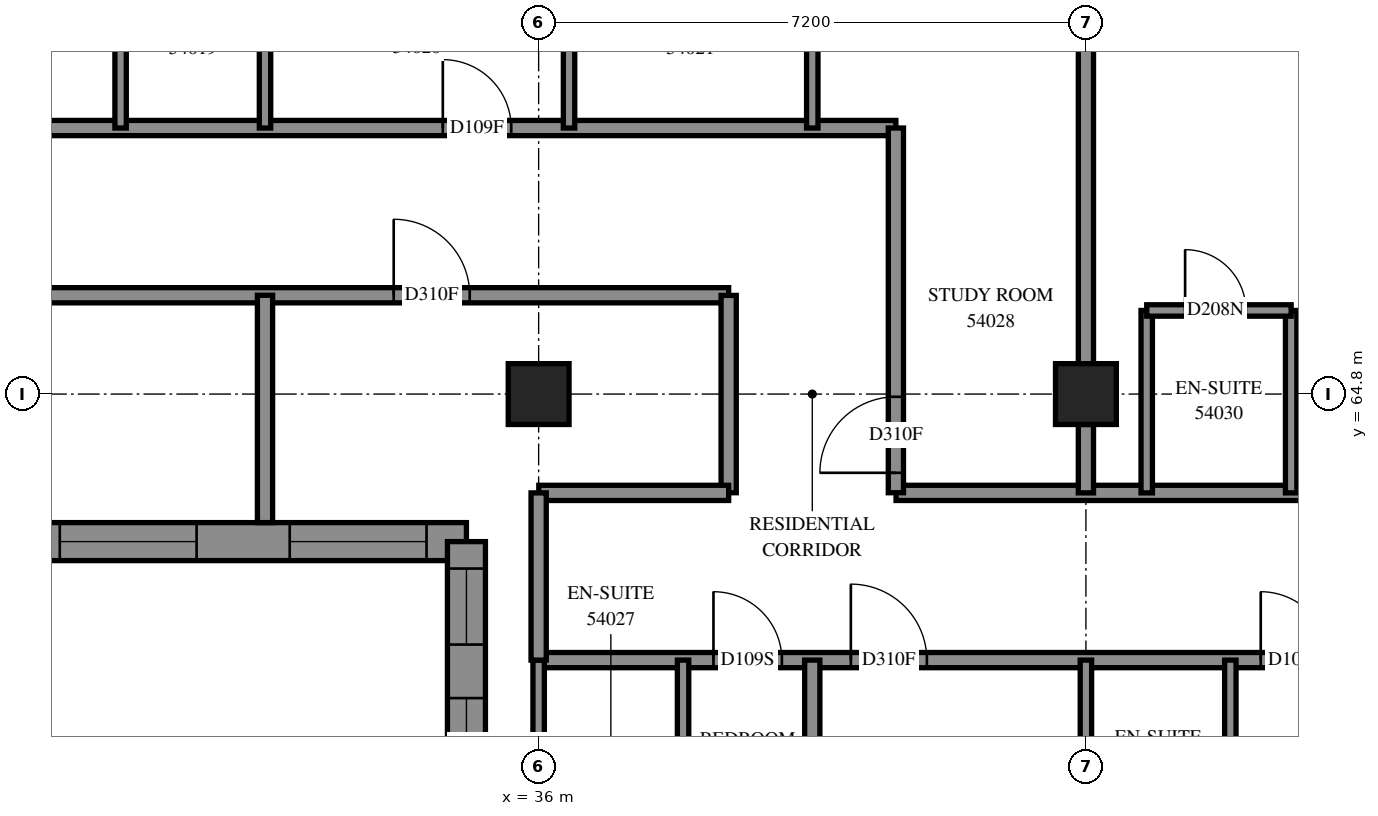
"""IFC4 building model, lengths in metres.
Left out: names, types, materials, properties, quantities, classifications, styles, units other than length and angle.
Written with IfcOpenShell. Run it as: python <this file> out.ifc"""

import sys

from ifc_helpers import new_model, si_unit, direction, frame, frame_2d, origin, origin_2d, place, context, subcontext, project, spatial, polyline, rectangle, outline, extrude, element, fill, save


model = new_model("IFC4")
c1 = context("Model", 3, precision=1e-05, world=origin(), true_north=direction((0.0, 1.0)))
c2 = subcontext(c1, "Body", "Model", "MODEL_VIEW")
j1 = project(units=[si_unit("LENGTHUNIT", "METRE"), si_unit("PLANEANGLEUNIT", "RADIAN")], contexts=[c1])
p1 = place(None, origin())
s1 = spatial("IfcSite", under=j1, at=p1, CompositionType="ELEMENT")
p2 = place(p1, origin())
s2 = spatial("IfcBuilding", under=s1, at=p2, CompositionType="ELEMENT")
p3 = place(p2, frame((0.0, 0.0, 199.8)))
s3 = spatial("IfcBuildingStorey", under=s2, at=p3, CompositionType="ELEMENT", Elevation=199.8)
for number, where, z_axis, x_axis in (
    (1, (36.0, 64.8, 0.0), (0.0, 0.0, 1.0), (1.0, 0.0, 0.0)),
    (2, (43.2, 64.8, 0.0), (0.0, 0.0, 1.0), (1.0, 0.0, 0.0)),
):
    element("IfcColumn", number, at=place(p3, frame(where, z_axis=z_axis, x_axis=x_axis)), inside=s3, PredefinedType="COLUMN", context=c2, shape_type="SweptSolid", body=[
        extrude(rectangle(XDim=0.8, YDim=0.8, at=origin_2d()), origin(), (0.0, 0.0, 1.0), 3.1),
    ])
p4 = place(p3, frame((19.659, 62.859, 0.0), z_axis=(0.0, 0.0, 1.0), x_axis=(1.0, 0.0, 0.0)))
e3 = element("IfcWall", 3, at=p4, inside=s3, PredefinedType="SOLIDWALL", context=c2, shape_type="SweptSolid", body=[
    extrude(outline(polyline([(-0.25, -0.25), (15.141, -0.25), (15.641, 0.25), (0.25, 0.25), (-0.25, -0.25)])), origin(), (0.0, 0.0, 1.0), 2.6),
])
p5 = place(p4, frame((2.691, 0.0, 0.6)))
e4 = element("IfcOpeningElement", 4, at=p5, cuts=e3, PredefinedType="OPENING", context=c2, shape_type="SweptSolid", body=[
    extrude(rectangle(XDim=1.8, YDim=1.9, at=frame_2d((0.9, 0.95))), frame((0.0, 0.26, 0.0), z_axis=(0.0, -1.0, 0.0), x_axis=(1.0, 0.0, 0.0)), (0.0, 0.0, 1.0), 0.52),
])
p6 = place(p4, frame((6.441, 0.0, 0.6)))
e5 = element("IfcOpeningElement", 5, at=p6, cuts=e3, PredefinedType="OPENING", context=c2, shape_type="SweptSolid", body=[
    extrude(rectangle(XDim=1.8, YDim=1.9, at=frame_2d((0.9, 0.95))), frame((0.0, 0.26, 0.0), z_axis=(0.0, -1.0, 0.0), x_axis=(1.0, 0.0, 0.0)), (0.0, 0.0, 1.0), 0.52),
])
p7 = place(p4, frame((10.041, 0.0, 0.6)))
e6 = element("IfcOpeningElement", 6, at=p7, cuts=e3, PredefinedType="OPENING", context=c2, shape_type="SweptSolid", body=[
    extrude(rectangle(XDim=1.8, YDim=1.9, at=frame_2d((0.9, 0.95))), frame((0.0, 0.26, 0.0), z_axis=(0.0, -1.0, 0.0), x_axis=(1.0, 0.0, 0.0)), (0.0, 0.0, 1.0), 0.52),
])
p8 = place(p4, frame((13.066, 0.0, 0.6)))
e7 = element("IfcOpeningElement", 7, at=p8, cuts=e3, PredefinedType="OPENING", context=c2, shape_type="SweptSolid", body=[
    extrude(rectangle(XDim=1.8, YDim=1.9, at=frame_2d((0.9, 0.95))), frame((0.0, 0.26, 0.0), z_axis=(0.0, -1.0, 0.0), x_axis=(1.0, 0.0, 0.0)), (0.0, 0.0, 1.0), 0.52),
])
p9 = place(p4, frame((0.596, 0.0, 0.6)))
e8 = element("IfcOpeningElement", 8, at=p9, cuts=e3, PredefinedType="OPENING", context=c2, shape_type="SweptSolid", body=[
    extrude(rectangle(XDim=1.2, YDim=1.9, at=frame_2d((0.6, 0.95))), frame((0.0, 0.26, 0.0), z_axis=(0.0, -1.0, 0.0), x_axis=(1.0, 0.0, 0.0)), (0.0, 0.0, 1.0), 0.52),
])
p10 = place(p3, frame((35.05, 62.859, 0.0), z_axis=(0.0, 0.0, 1.0), x_axis=(0.0, -1.0, 0.0)))
e9 = element("IfcWall", 9, at=p10, inside=s3, PredefinedType="SOLIDWALL", context=c2, shape_type="SweptSolid", body=[
    extrude(outline(polyline([(0.25, -0.25), (6.459, -0.25), (5.959, 0.25), (-0.25, 0.25), (0.25, -0.25)])), origin(), (0.0, 0.0, 1.0), 3.1),
])
p11 = place(p10, frame((2.059, 0.0, 0.45)))
e10 = element("IfcOpeningElement", 10, at=p11, cuts=e9, PredefinedType="OPENING", context=c2, shape_type="SweptSolid", body=[
    extrude(rectangle(XDim=1.3, YDim=2.5, at=frame_2d((0.65, 1.25))), frame((0.0, 0.26, 0.0), z_axis=(0.0, -1.0, 0.0), x_axis=(1.0, 0.0, 0.0)), (0.0, 0.0, 1.0), 0.52),
])
p12 = place(p10, frame((4.109, 0.0, 0.45)))
e11 = element("IfcOpeningElement", 11, at=p12, cuts=e9, PredefinedType="OPENING", context=c2, shape_type="SweptSolid", body=[
    extrude(rectangle(XDim=1.3, YDim=2.5, at=frame_2d((0.65, 1.25))), frame((0.0, 0.26, 0.0), z_axis=(0.0, -1.0, 0.0), x_axis=(1.0, 0.0, 0.0)), (0.0, 0.0, 1.0), 0.52),
])
p13 = place(p10, frame((0.354, 0.0, 0.45)))
e12 = element("IfcOpeningElement", 12, at=p13, cuts=e9, PredefinedType="OPENING", context=c2, shape_type="SweptSolid", body=[
    extrude(rectangle(XDim=1.0, YDim=2.5, at=frame_2d((0.5, 1.25))), frame((0.0, 0.26, 0.0), z_axis=(0.0, -1.0, 0.0), x_axis=(1.0, 0.0, 0.0)), (0.0, 0.0, 1.0), 0.52),
])
p14 = place(p3, frame((21.6, 68.3, 0.0), z_axis=(0.0, 0.0, 1.0), x_axis=(1.0, 0.0, 0.0)))
e13 = element("IfcWall", 13, at=p14, inside=s3, PredefinedType="PARTITIONING", context=c2, shape_type="SweptSolid", body=[
    extrude(rectangle(XDim=19.1, YDim=0.2, at=frame_2d((9.55, 0.0))), origin(), (0.0, 0.0, 1.0), 3.1),
])
p15 = place(p14, frame((2.3, 0.0, 0.0)))
e14 = element("IfcOpeningElement", 14, at=p15, cuts=e13, PredefinedType="OPENING", context=c2, shape_type="SweptSolid", body=[
    extrude(rectangle(XDim=0.9, YDim=2.1, at=frame_2d((0.45, 1.05))), frame((0.0, 0.11, 0.0), z_axis=(0.0, -1.0, 0.0), x_axis=(1.0, 0.0, 0.0)), (0.0, 0.0, 1.0), 0.22),
])
p16 = place(p14, frame((5.901, 0.0, 0.0)))
e15 = element("IfcOpeningElement", 15, at=p16, cuts=e13, PredefinedType="OPENING", context=c2, shape_type="SweptSolid", body=[
    extrude(rectangle(XDim=0.9, YDim=2.1, at=frame_2d((0.45, 1.05))), frame((0.0, 0.11, 0.0), z_axis=(0.0, -1.0, 0.0), x_axis=(1.0, 0.0, 0.0)), (0.0, 0.0, 1.0), 0.22),
])
p17 = place(p14, frame((13.139, 0.0, 0.0)))
e16 = element("IfcOpeningElement", 16, at=p17, cuts=e13, PredefinedType="OPENING", context=c2, shape_type="SweptSolid", body=[
    extrude(rectangle(XDim=0.9, YDim=2.1, at=frame_2d((0.45, 1.05))), frame((0.0, 0.11, 0.0), z_axis=(0.0, -1.0, 0.0), x_axis=(1.0, 0.0, 0.0)), (0.0, 0.0, 1.0), 0.22),
])
p18 = place(p3, frame((21.6, 66.1, 0.0), z_axis=(0.0, 0.0, 1.0), x_axis=(1.0, 0.0, 0.0)))
e17 = element("IfcWall", 17, at=p18, inside=s3, PredefinedType="PARTITIONING", context=c2, shape_type="SweptSolid", body=[
    extrude(rectangle(XDim=16.9, YDim=0.2, at=frame_2d((8.45, 0.0))), origin(), (0.0, 0.0, 1.0), 3.1),
])
p19 = place(p18, frame((12.493, 0.0, 0.0)))
e18 = element("IfcOpeningElement", 18, at=p19, cuts=e17, PredefinedType="OPENING", context=c2, shape_type="SweptSolid", body=[
    extrude(rectangle(XDim=1.0, YDim=2.1, at=frame_2d((0.5, 1.05))), frame((0.0, 0.11, 0.0), z_axis=(0.0, -1.0, 0.0), x_axis=(1.0, 0.0, 0.0)), (0.0, 0.0, 1.0), 0.22),
])
p20 = place(p3, frame((36.0, 61.3, 0.0), z_axis=(0.0, 0.0, 1.0), x_axis=(1.0, 0.0, 0.0)))
e19 = element("IfcWall", 19, at=p20, inside=s3, PredefinedType="PARTITIONING", context=c2, shape_type="SweptSolid", body=[
    extrude(rectangle(XDim=16.9, YDim=0.2, at=frame_2d((8.45, 0.0))), origin(), (0.0, 0.0, 1.0), 3.1),
])
p21 = place(p20, frame((2.3, 0.0, 0.0)))
e20 = element("IfcOpeningElement", 20, at=p21, cuts=e19, PredefinedType="OPENING", context=c2, shape_type="SweptSolid", body=[
    extrude(rectangle(XDim=0.9, YDim=2.1, at=frame_2d((0.45, 1.05))), frame((0.0, 0.11, 0.0), z_axis=(0.0, -1.0, 0.0), x_axis=(1.0, 0.0, 0.0)), (0.0, 0.0, 1.0), 0.22),
])
p22 = place(p20, frame((4.107, 0.0, 0.0)))
e21 = element("IfcOpeningElement", 21, at=p22, cuts=e19, PredefinedType="OPENING", context=c2, shape_type="SweptSolid", body=[
    extrude(rectangle(XDim=1.0, YDim=2.1, at=frame_2d((0.5, 1.05))), frame((0.0, 0.11, 0.0), z_axis=(0.0, -1.0, 0.0), x_axis=(1.0, 0.0, 0.0)), (0.0, 0.0, 1.0), 0.22),
])
p23 = place(p20, frame((9.5, 0.0, 0.0)))
e22 = element("IfcOpeningElement", 22, at=p23, cuts=e19, PredefinedType="OPENING", context=c2, shape_type="SweptSolid", body=[
    extrude(rectangle(XDim=0.9, YDim=2.1, at=frame_2d((0.45, 1.05))), frame((0.0, 0.11, 0.0), z_axis=(0.0, -1.0, 0.0), x_axis=(1.0, 0.0, 0.0)), (0.0, 0.0, 1.0), 0.22),
])
p24 = place(p20, frame((11.307, 0.0, 0.0)))
e23 = element("IfcOpeningElement", 23, at=p24, cuts=e19, PredefinedType="OPENING", context=c2, shape_type="SweptSolid", body=[
    extrude(rectangle(XDim=1.0, YDim=2.1, at=frame_2d((0.5, 1.05))), frame((0.0, 0.11, 0.0), z_axis=(0.0, -1.0, 0.0), x_axis=(1.0, 0.0, 0.0)), (0.0, 0.0, 1.0), 0.22),
])
p25 = place(p20, frame((15.647, 0.0, 0.0)))
e24 = element("IfcOpeningElement", 24, at=p25, cuts=e19, PredefinedType="OPENING", context=c2, shape_type="SweptSolid", body=[
    extrude(rectangle(XDim=1.0, YDim=2.1, at=frame_2d((0.5, 1.05))), frame((0.0, 0.11, 0.0), z_axis=(0.0, -1.0, 0.0), x_axis=(1.0, 0.0, 0.0)), (0.0, 0.0, 1.0), 0.22),
])
p26 = place(p3, frame((40.702, 63.5, 0.0), z_axis=(0.0, 0.0, 1.0), x_axis=(1.0, 0.0, 0.0)))
e25 = element("IfcWall", 25, at=p26, inside=s3, PredefinedType="PARTITIONING", context=c2, shape_type="SweptSolid", body=[
    extrude(rectangle(XDim=14.298, YDim=0.2, at=frame_2d((7.149, 0.0))), origin(), (0.0, 0.0, 1.0), 3.1),
])
p27 = place(p26, frame((6.332, 0.0, 0.0)))
e26 = element("IfcOpeningElement", 26, at=p27, cuts=e25, PredefinedType="OPENING", context=c2, shape_type="SweptSolid", body=[
    extrude(rectangle(XDim=0.9, YDim=2.1, at=frame_2d((0.45, 1.05))), frame((0.0, 0.11, 0.0), z_axis=(0.0, -1.0, 0.0), x_axis=(1.0, 0.0, 0.0)), (0.0, 0.0, 1.0), 0.22),
])
p28 = place(p26, frame((10.098, 0.0, 0.0)))
e27 = element("IfcOpeningElement", 27, at=p28, cuts=e25, PredefinedType="OPENING", context=c2, shape_type="SweptSolid", body=[
    extrude(rectangle(XDim=0.9, YDim=2.1, at=frame_2d((0.45, 1.05))), frame((0.0, 0.11, 0.0), z_axis=(0.0, -1.0, 0.0), x_axis=(1.0, 0.0, 0.0)), (0.0, 0.0, 1.0), 0.22),
])
p29 = place(p3, frame((43.2, 65.2, 0.0), z_axis=(0.0, 0.0, 1.0), x_axis=(0.0, 1.0, 0.0)))
e28 = element("IfcWall", 28, at=p29, inside=s3, PredefinedType="PARTITIONING", context=c2, shape_type="SweptSolid", body=[
    extrude(rectangle(XDim=6.4, YDim=0.2, at=frame_2d((3.2, 0.0))), origin(), (0.0, 0.0, 1.0), 3.1),
])
p30 = place(p3, frame((40.7, 63.502, 0.0), z_axis=(0.0, 0.0, 1.0), x_axis=(0.0, 1.0, 0.0)))
e29 = element("IfcWall", 29, at=p30, inside=s3, PredefinedType="PARTITIONING", context=c2, shape_type="SweptSolid", body=[
    extrude(rectangle(XDim=4.798, YDim=0.2, at=frame_2d((2.399, 0.0))), origin(), (0.0, 0.0, 1.0), 3.1),
])
p31 = place(p30, frame((0.262, 0.0, 0.0)))
e30 = element("IfcOpeningElement", 30, at=p31, cuts=e29, PredefinedType="OPENING", context=c2, shape_type="SweptSolid", body=[
    extrude(rectangle(XDim=1.0, YDim=2.1, at=frame_2d((0.5, 1.05))), frame((0.0, 0.11, 0.0), z_axis=(0.0, -1.0, 0.0), x_axis=(1.0, 0.0, 0.0)), (0.0, 0.0, 1.0), 0.22),
])
p32 = place(p3, frame((39.6, 56.9, 0.0), z_axis=(0.0, 0.0, 1.0), x_axis=(0.0, 1.0, 0.0)))
e31 = element("IfcWall", 31, at=p32, inside=s3, PredefinedType="PARTITIONING", context=c2, shape_type="SweptSolid", body=[
    extrude(rectangle(XDim=4.4, YDim=0.2, at=frame_2d((2.2, 0.0))), origin(), (0.0, 0.0, 1.0), 3.1),
])
p33 = place(p3, frame((32.4, 63.109, 0.0), z_axis=(0.0, 0.0, 1.0), x_axis=(0.0, 1.0, 0.0)))
e32 = element("IfcWall", 32, at=p33, inside=s3, PredefinedType="PARTITIONING", context=c2, shape_type="SweptSolid", body=[
    extrude(rectangle(XDim=2.991, YDim=0.2, at=frame_2d((1.496, 0.0))), origin(), (0.0, 0.0, 1.0), 3.1),
])
p34 = place(p3, frame((38.5, 63.502, 0.0), z_axis=(0.0, 0.0, 1.0), x_axis=(0.0, 1.0, 0.0)))
e33 = element("IfcWall", 33, at=p34, inside=s3, PredefinedType="PARTITIONING", context=c2, shape_type="SweptSolid", body=[
    extrude(rectangle(XDim=2.596, YDim=0.2, at=frame_2d((1.298, 0.0))), origin(), (0.0, 0.0, 1.0), 3.1),
])
p35 = place(p3, frame((36.002, 63.5, 0.0), z_axis=(0.0, 0.0, 1.0), x_axis=(1.0, 0.0, 0.0)))
e34 = element("IfcWall", 34, at=p35, inside=s3, PredefinedType="PARTITIONING", context=c2, shape_type="SweptSolid", body=[
    extrude(rectangle(XDim=2.498, YDim=0.2, at=frame_2d((1.249, 0.0))), origin(), (0.0, 0.0, 1.0), 3.1),
])
for number, where, z_axis, x_axis in (
    (35, (30.5, 68.3, 0.0), (0.0, 0.0, 1.0), (0.0, 1.0, 0.0)),
    (36, (32.4, 68.3, 0.0), (0.0, 0.0, 1.0), (0.0, 1.0, 0.0)),
    (37, (36.4, 68.3, 0.0), (0.0, 0.0, 1.0), (0.0, 1.0, 0.0)),
    (38, (39.6, 68.3, 0.0), (0.0, 0.0, 1.0), (0.0, 1.0, 0.0)),
    (39, (44.0, 63.5, 0.0), (0.0, 0.0, 1.0), (0.0, 1.0, 0.0)),
    (40, (45.9, 63.5, 0.0), (0.0, 0.0, 1.0), (0.0, 1.0, 0.0)),
    (41, (37.9, 58.9, 0.0), (0.0, 0.0, 1.0), (0.0, 1.0, 0.0)),
):
    element("IfcWall", number, at=place(p3, frame(where, z_axis=z_axis, x_axis=x_axis)), inside=s3, PredefinedType="PARTITIONING", context=c2, shape_type="SweptSolid", body=[
        extrude(rectangle(XDim=2.4, YDim=0.15, at=frame_2d((1.2, 0.0))), origin(), (0.0, 0.0, 1.0), 3.1),
    ])
p36 = place(p3, frame((36.0, 58.9, 0.0), z_axis=(0.0, 0.0, 1.0), x_axis=(0.0, 1.0, 0.0)))
e42 = element("IfcWall", 42, at=p36, inside=s3, PredefinedType="PARTITIONING", context=c2, shape_type="SweptSolid", body=[
    extrude(rectangle(XDim=2.4, YDim=0.15, at=frame_2d((1.2, 0.0))), origin(), (0.0, 0.0, 1.0), 2.6),
])
for number, where, z_axis, x_axis in (
    (43, (45.1, 58.9, 0.0), (0.0, 0.0, 1.0), (0.0, 1.0, 0.0)),
    (44, (43.2, 58.9, 0.0), (0.0, 0.0, 1.0), (0.0, 1.0, 0.0)),
):
    element("IfcWall", number, at=place(p3, frame(where, z_axis=z_axis, x_axis=x_axis)), inside=s3, PredefinedType="PARTITIONING", context=c2, shape_type="SweptSolid", body=[
        extrude(rectangle(XDim=2.4, YDim=0.15, at=frame_2d((1.2, 0.0))), origin(), (0.0, 0.0, 1.0), 3.1),
    ])
p37 = place(p3, frame((36.0, 61.3, 0.0), z_axis=(0.0, 0.0, 1.0), x_axis=(0.0, 1.0, 0.0)))
e45 = element("IfcWall", 45, at=p37, inside=s3, PredefinedType="PARTITIONING", context=c2, shape_type="SweptSolid", body=[
    extrude(rectangle(XDim=2.2, YDim=0.2, at=frame_2d((1.1, 0.0))), origin(), (0.0, 0.0, 1.0), 2.6),
])
p38 = place(p3, frame((44.0, 65.9, 0.0), z_axis=(0.0, 0.0, 1.0), x_axis=(1.0, 0.0, 0.0)))
e46 = element("IfcWall", 46, at=p38, inside=s3, PredefinedType="PARTITIONING", context=c2, shape_type="SweptSolid", body=[
    extrude(rectangle(XDim=1.9, YDim=0.15, at=frame_2d((0.95, 0.0))), origin(), (0.0, 0.0, 1.0), 3.1),
])
p39 = place(p38, frame((0.505, 0.0, 0.0)))
e47 = element("IfcOpeningElement", 47, at=p39, cuts=e46, PredefinedType="OPENING", context=c2, shape_type="SweptSolid", body=[
    extrude(rectangle(XDim=0.8, YDim=2.1, at=frame_2d((0.4, 1.05))), frame((0.0, 0.085, 0.0), z_axis=(0.0, -1.0, 0.0), x_axis=(1.0, 0.0, 0.0)), (0.0, 0.0, 1.0), 0.17),
])
p40 = place(p3, frame((43.2, 63.5, 0.0), z_axis=(0.0, 0.0, 1.0), x_axis=(0.0, 1.0, 0.0)))
e48 = element("IfcWall", 48, at=p40, inside=s3, PredefinedType="PARTITIONING", context=c2, shape_type="SweptSolid", body=[
    extrude(rectangle(XDim=0.9, YDim=0.2, at=frame_2d((0.45, 0.0))), origin(), (0.0, 0.0, 1.0), 3.1),
])
p41 = place(p7, origin())
e49 = element("IfcWindow", 49, at=p41, inside=s3, PartitioningType="SINGLE_PANEL", PredefinedType="WINDOW", context=c2, shape_type="SweptSolid", body=[
    extrude(rectangle(XDim=1.8, YDim=1.9, at=frame_2d((0.9, 0.95))), frame((0.0, 0.18, 0.0), z_axis=(0.0, -1.0, 0.0), x_axis=(1.0, 0.0, 0.0)), (0.0, 0.0, 1.0), 0.06),
])
fill(e6, e49)
p42 = place(p8, origin())
e50 = element("IfcWindow", 50, at=p42, inside=s3, PartitioningType="SINGLE_PANEL", PredefinedType="WINDOW", context=c2, shape_type="SweptSolid", body=[
    extrude(rectangle(XDim=1.8, YDim=1.9, at=frame_2d((0.9, 0.95))), frame((0.0, 0.18, 0.0), z_axis=(0.0, -1.0, 0.0), x_axis=(1.0, 0.0, 0.0)), (0.0, 0.0, 1.0), 0.06),
])
fill(e7, e50)
p43 = place(p11, origin())
e51 = element("IfcWindow", 51, at=p43, inside=s3, PartitioningType="SINGLE_PANEL", PredefinedType="WINDOW", context=c2, shape_type="SweptSolid", body=[
    extrude(rectangle(XDim=1.3, YDim=2.5, at=frame_2d((0.65, 1.25))), frame((0.0, 0.18, 0.0), z_axis=(0.0, -1.0, 0.0), x_axis=(1.0, 0.0, 0.0)), (0.0, 0.0, 1.0), 0.06),
])
fill(e10, e51)
p44 = place(p17, origin())
e52 = element("IfcDoor", 52, at=p44, inside=s3, OperationType="SINGLE_SWING_LEFT", PredefinedType="DOOR", context=c2, shape_type="SweptSolid", body=[
    extrude(rectangle(XDim=0.9, YDim=2.1, at=frame_2d((0.45, 1.05))), frame((0.0, 0.025, 0.0), z_axis=(0.0, -1.0, 0.0), x_axis=(1.0, 0.0, 0.0)), (0.0, 0.0, 1.0), 0.05),
])
fill(e16, e52)
p45 = place(p19, origin())
e53 = element("IfcDoor", 53, at=p45, inside=s3, OperationType="SINGLE_SWING_RIGHT", PredefinedType="DOOR", context=c2, shape_type="SweptSolid", body=[
    extrude(rectangle(XDim=1.0, YDim=2.1, at=frame_2d((0.5, 1.05))), frame((0.0, 0.025, 0.0), z_axis=(0.0, -1.0, 0.0), x_axis=(1.0, 0.0, 0.0)), (0.0, 0.0, 1.0), 0.05),
])
fill(e18, e53)
p46 = place(p21, origin())
e54 = element("IfcDoor", 54, at=p46, inside=s3, OperationType="SINGLE_SWING_LEFT", PredefinedType="DOOR", context=c2, shape_type="SweptSolid", body=[
    extrude(rectangle(XDim=0.9, YDim=2.1, at=frame_2d((0.45, 1.05))), frame((0.0, 0.025, 0.0), z_axis=(0.0, -1.0, 0.0), x_axis=(1.0, 0.0, 0.0)), (0.0, 0.0, 1.0), 0.05),
])
fill(e20, e54)
p47 = place(p31, origin())
e55 = element("IfcDoor", 55, at=p47, inside=s3, OperationType="SINGLE_SWING_LEFT", PredefinedType="DOOR", context=c2, shape_type="SweptSolid", body=[
    extrude(rectangle(XDim=1.0, YDim=2.1, at=frame_2d((0.5, 1.05))), frame((0.0, 0.025, 0.0), z_axis=(0.0, -1.0, 0.0), x_axis=(1.0, 0.0, 0.0)), (0.0, 0.0, 1.0), 0.05),
])
fill(e30, e55)
p48 = place(p39, origin())
e56 = element("IfcDoor", 56, at=p48, inside=s3, OperationType="SINGLE_SWING_RIGHT", PredefinedType="DOOR", context=c2, shape_type="SweptSolid", body=[
    extrude(rectangle(XDim=0.8, YDim=2.1, at=frame_2d((0.4, 1.05))), frame((0.0, 0.025, 0.0), z_axis=(0.0, -1.0, 0.0), x_axis=(1.0, 0.0, 0.0)), (0.0, 0.0, 1.0), 0.05),
])
fill(e47, e56)
p49 = place(p22, origin())
e57 = element("IfcDoor", 57, at=p49, inside=s3, OperationType="SINGLE_SWING_RIGHT", PredefinedType="DOOR", context=c2, shape_type="SweptSolid", body=[
    extrude(rectangle(XDim=1.0, YDim=2.1, at=frame_2d((0.5, 1.05))), frame((0.0, 0.025, 0.0), z_axis=(0.0, -1.0, 0.0), x_axis=(1.0, 0.0, 0.0)), (0.0, 0.0, 1.0), 0.05),
])
fill(e21, e57)
p50 = place(p23, origin())
e58 = element("IfcDoor", 58, at=p50, inside=s3, OperationType="SINGLE_SWING_LEFT", PredefinedType="DOOR", context=c2, shape_type="SweptSolid", body=[
    extrude(rectangle(XDim=0.9, YDim=2.1, at=frame_2d((0.45, 1.05))), frame((0.0, 0.025, 0.0), z_axis=(0.0, -1.0, 0.0), x_axis=(1.0, 0.0, 0.0)), (0.0, 0.0, 1.0), 0.05),
])
fill(e22, e58)
p51 = place(p13, origin())
e59 = element("IfcWindow", 59, at=p51, inside=s3, PartitioningType="SINGLE_PANEL", PredefinedType="WINDOW", context=c2, shape_type="SweptSolid", body=[
    extrude(rectangle(XDim=1.0, YDim=2.5, at=frame_2d((0.5, 1.25))), frame((0.0, 0.18, 0.0), z_axis=(0.0, -1.0, 0.0), x_axis=(1.0, 0.0, 0.0)), (0.0, 0.0, 1.0), 0.06),
])
fill(e12, e59)
save(model, sys.argv[1])
